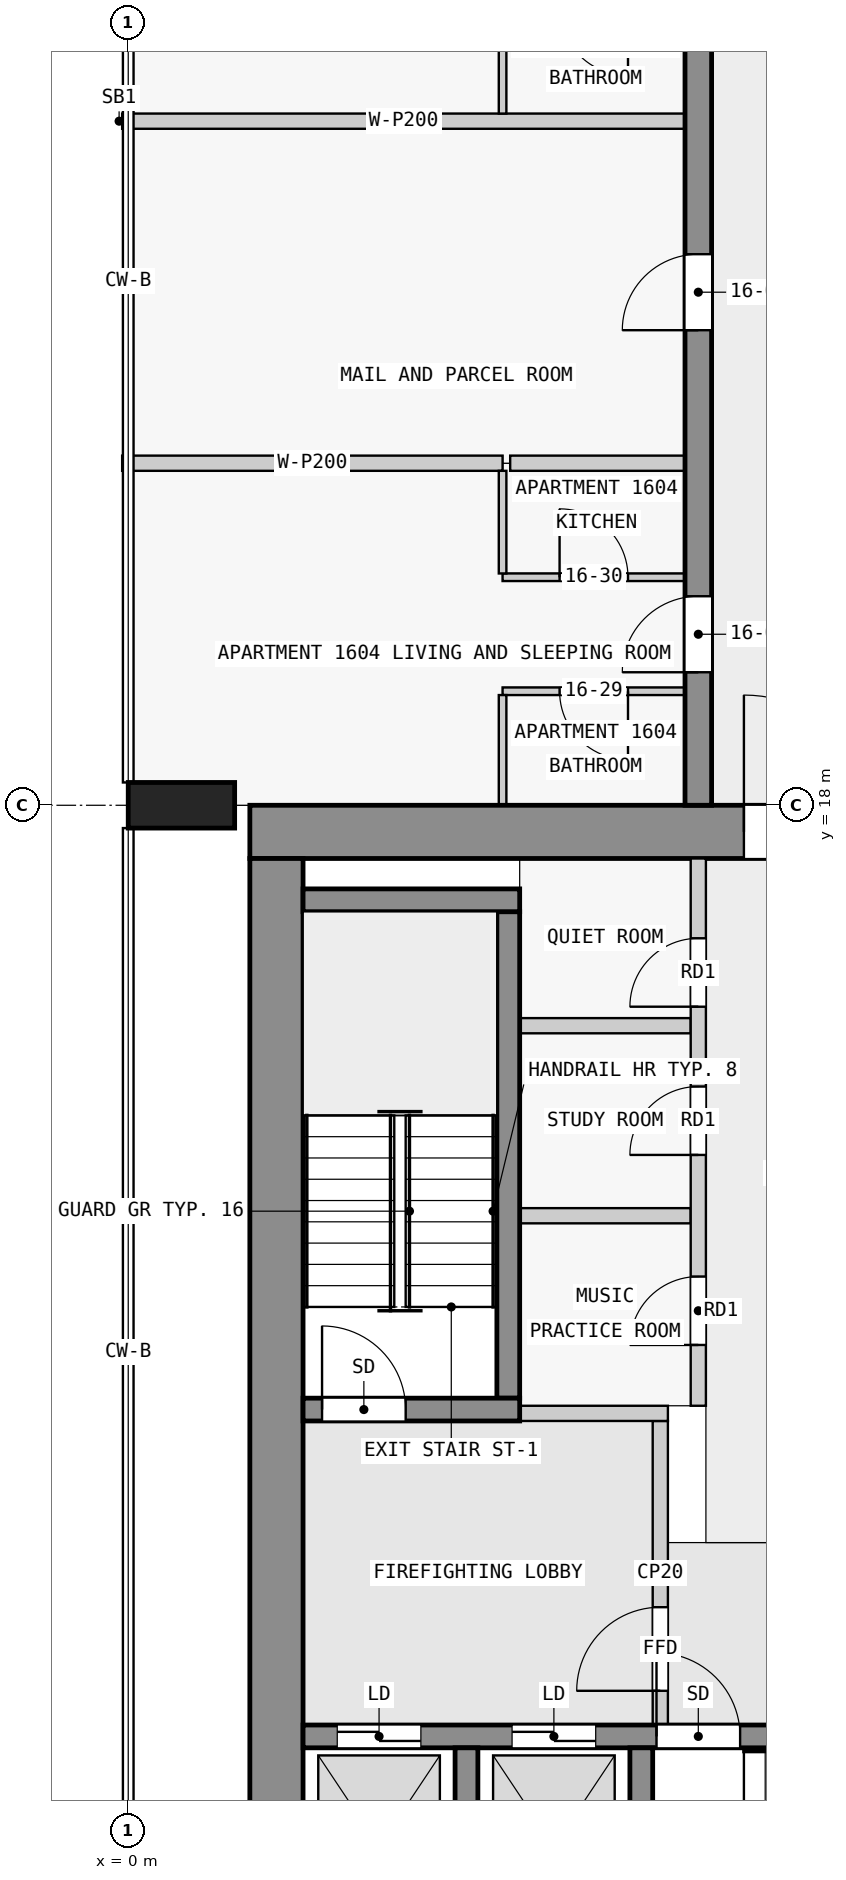
"""IFC4 building model, lengths in metres.
Left out: names, types, materials, properties, quantities, classifications, styles, units other than length and angle.
Written with IfcOpenShell. Run it as: python <this file> out.ifc"""

import sys

from ifc_helpers import new_model, si_unit, direction, frame, frame_2d, origin, origin_2d, place, context, subcontext, project, spatial, rectangle, extrude, element, fill, save


model = new_model("IFC4")
c1 = context("Model", 3, precision=1e-05, world=origin(), true_north=direction((0.0, 1.0)))
c2 = subcontext(c1, "Body", "Model", "MODEL_VIEW")
j1 = project(units=[si_unit("LENGTHUNIT", "METRE"), si_unit("PLANEANGLEUNIT", "RADIAN")], contexts=[c1])
p1 = place(None, origin())
s1 = spatial("IfcSite", under=j1, at=p1, CompositionType="ELEMENT")
p2 = place(p1, origin())
s2 = spatial("IfcBuilding", under=s1, at=p2, CompositionType="ELEMENT")
p3 = place(p2, frame((0.0, 0.0, 65.3)))
s3 = spatial("IfcBuildingStorey", under=s2, at=p3, CompositionType="ELEMENT", Elevation=65.3)
p4 = place(p3, frame((0.7, 18.0, 0.0), z_axis=(0.0, 0.0, 1.0), x_axis=(0.0, 1.0, 0.0)))
e1 = element("IfcColumn", 1, at=p4, inside=s3, PredefinedType="COLUMN", context=c2, shape_type="SweptSolid", body=[
    extrude(rectangle(XDim=0.6, YDim=1.4, at=origin_2d()), origin(), (0.0, 0.0, 1.0), 3.5),
])
p5 = place(p3, frame((1.6, 17.65, 0.0), z_axis=(0.0, 0.0, 1.0), x_axis=(1.0, 0.0, 0.0)))
e2 = element("IfcWall", 2, at=p5, inside=s3, PredefinedType="SHEAR", context=c2, shape_type="SweptSolid", body=[
    extrude(rectangle(XDim=20.9, YDim=0.7, at=frame_2d((10.45, 0.0))), origin(), (0.0, 0.0, 1.0), 3.25),
])
p6 = place(p5, frame((6.5, 0.0, 0.0)))
e3 = element("IfcOpeningElement", 3, at=p6, cuts=e2, PredefinedType="OPENING", context=c2, shape_type="SweptSolid", body=[
    extrude(rectangle(XDim=1.8, YDim=2.1, at=frame_2d((0.9, 1.05))), frame((0.0, 0.36, 0.0), z_axis=(0.0, -1.0, 0.0), x_axis=(1.0, 0.0, 0.0)), (0.0, 0.0, 1.0), 0.72),
])
p7 = place(p3, frame((1.95, 2.5, 0.0), z_axis=(0.0, 0.0, 1.0), x_axis=(0.0, 1.0, 0.0)))
e4 = element("IfcWall", 4, at=p7, inside=s3, PredefinedType="SHEAR", context=c2, shape_type="SweptSolid", body=[
    extrude(rectangle(XDim=14.8, YDim=0.7, at=frame_2d((7.4, 0.0))), origin(), (0.0, 0.0, 1.0), 3.25),
])
for number, where, z_axis, x_axis in (
    (5, (4.45, 2.8, 0.0), (0.0, 0.0, 1.0), (0.0, 1.0, 0.0)),
    (6, (6.75, 2.8, 0.0), (0.0, 0.0, 1.0), (0.0, 1.0, 0.0)),
):
    element("IfcWall", number, at=place(p3, frame(where, z_axis=z_axis, x_axis=x_axis)), inside=s3, PredefinedType="SHEAR", context=c2, shape_type="SweptSolid", body=[
        extrude(rectangle(XDim=2.8, YDim=0.3, at=frame_2d((1.4, 0.0))), origin(), (0.0, 0.0, 1.0), 3.25),
    ])
p8 = place(p3, frame((2.3, 5.75, 0.0), z_axis=(0.0, 0.0, 1.0), x_axis=(1.0, 0.0, 0.0)))
e7 = element("IfcWall", 7, at=p8, inside=s3, PredefinedType="SHEAR", context=c2, shape_type="SweptSolid", body=[
    extrude(rectangle(XDim=18.8, YDim=0.3, at=frame_2d((9.4, 0.0))), origin(), (0.0, 0.0, 1.0), 3.25),
])
p9 = place(p8, frame((4.65, 0.0, 0.0)))
e8 = element("IfcOpeningElement", 8, at=p9, cuts=e7, PredefinedType="OPENING", context=c2, shape_type="SweptSolid", body=[
    extrude(rectangle(XDim=1.1, YDim=2.1, at=frame_2d((0.55, 1.05))), frame((0.0, 0.16, 0.0), z_axis=(0.0, -1.0, 0.0), x_axis=(1.0, 0.0, 0.0)), (0.0, 0.0, 1.0), 0.32),
])
p10 = place(p8, frame((0.45, 0.0, 0.0)))
e9 = element("IfcOpeningElement", 9, at=p10, cuts=e7, PredefinedType="OPENING", context=c2, shape_type="SweptSolid", body=[
    extrude(rectangle(XDim=1.1, YDim=2.1, at=frame_2d((0.55, 1.05))), frame((0.0, 0.16, 0.0), z_axis=(0.0, -1.0, 0.0), x_axis=(1.0, 0.0, 0.0)), (0.0, 0.0, 1.0), 0.32),
])
p11 = place(p8, frame((2.75, 0.0, 0.0)))
e10 = element("IfcOpeningElement", 10, at=p11, cuts=e7, PredefinedType="OPENING", context=c2, shape_type="SweptSolid", body=[
    extrude(rectangle(XDim=1.1, YDim=2.1, at=frame_2d((0.55, 1.05))), frame((0.0, 0.16, 0.0), z_axis=(0.0, -1.0, 0.0), x_axis=(1.0, 0.0, 0.0)), (0.0, 0.0, 1.0), 0.32),
])
p12 = place(p8, frame((11.85, 0.0, 0.0)))
e11 = element("IfcOpeningElement", 11, at=p12, cuts=e7, PredefinedType="OPENING", context=c2, shape_type="SweptSolid", body=[
    extrude(rectangle(XDim=1.1, YDim=2.1, at=frame_2d((0.55, 1.05))), frame((0.0, 0.16, 0.0), z_axis=(0.0, -1.0, 0.0), x_axis=(1.0, 0.0, 0.0)), (0.0, 0.0, 1.0), 0.32),
])
p13 = place(p8, frame((14.35, 0.0, 0.0)))
e12 = element("IfcOpeningElement", 12, at=p13, cuts=e7, PredefinedType="OPENING", context=c2, shape_type="SweptSolid", body=[
    extrude(rectangle(XDim=1.1, YDim=2.1, at=frame_2d((0.55, 1.05))), frame((0.0, 0.16, 0.0), z_axis=(0.0, -1.0, 0.0), x_axis=(1.0, 0.0, 0.0)), (0.0, 0.0, 1.0), 0.32),
])
p14 = place(p8, frame((16.85, 0.0, 0.0)))
e13 = element("IfcOpeningElement", 13, at=p14, cuts=e7, PredefinedType="OPENING", context=c2, shape_type="SweptSolid", body=[
    extrude(rectangle(XDim=1.1, YDim=2.1, at=frame_2d((0.55, 1.05))), frame((0.0, 0.16, 0.0), z_axis=(0.0, -1.0, 0.0), x_axis=(1.0, 0.0, 0.0)), (0.0, 0.0, 1.0), 0.32),
])
p15 = place(p3, frame((2.3, 10.05, 0.0), z_axis=(0.0, 0.0, 1.0), x_axis=(1.0, 0.0, 0.0)))
e14 = element("IfcWall", 14, at=p15, inside=s3, PredefinedType="SHEAR", context=c2, shape_type="SweptSolid", body=[
    extrude(rectangle(XDim=2.85, YDim=0.3, at=frame_2d((1.425, 0.0))), origin(), (0.0, 0.0, 1.0), 3.25),
])
p16 = place(p15, frame((0.25, 0.0, 0.0)))
e15 = element("IfcOpeningElement", 15, at=p16, cuts=e14, PredefinedType="OPENING", context=c2, shape_type="SweptSolid", body=[
    extrude(rectangle(XDim=1.1, YDim=2.1, at=frame_2d((0.55, 1.05))), frame((0.0, 0.16, 0.0), z_axis=(0.0, -1.0, 0.0), x_axis=(1.0, 0.0, 0.0)), (0.0, 0.0, 1.0), 0.32),
])
p17 = place(p3, frame((5.0, 10.2, 0.0), z_axis=(0.0, 0.0, 1.0), x_axis=(0.0, 1.0, 0.0)))
e16 = element("IfcWall", 16, at=p17, inside=s3, PredefinedType="SHEAR", context=c2, shape_type="SweptSolid", body=[
    extrude(rectangle(XDim=6.4, YDim=0.3, at=frame_2d((3.2, 0.0))), origin(), (0.0, 0.0, 1.0), 3.25),
])
p18 = place(p3, frame((2.3, 16.75, 0.0), z_axis=(0.0, 0.0, 1.0), x_axis=(1.0, 0.0, 0.0)))
e17 = element("IfcWall", 17, at=p18, inside=s3, PredefinedType="SHEAR", context=c2, shape_type="SweptSolid", body=[
    extrude(rectangle(XDim=2.85, YDim=0.3, at=frame_2d((1.425, 0.0))), origin(), (0.0, 0.0, 1.0), 3.25),
])
p19 = place(p3, frame((7.5, 18.0, 0.0), z_axis=(0.0, 0.0, 1.0), x_axis=(0.0, 1.0, 0.0)))
e18 = element("IfcWall", 18, at=p19, inside=s3, PredefinedType="SHEAR", context=c2, shape_type="SweptSolid", body=[
    extrude(rectangle(XDim=27.0, YDim=0.35, at=frame_2d((13.5, 0.0))), origin(), (0.0, 0.0, 1.0), 3.25),
])
p20 = place(p19, frame((1.75, 0.0, 0.0)))
e19 = element("IfcOpeningElement", 19, at=p20, cuts=e18, PredefinedType="OPENING", context=c2, shape_type="SweptSolid", body=[
    extrude(rectangle(XDim=1.0, YDim=2.1, at=frame_2d((0.5, 1.05))), frame((0.0, 0.185, 0.0), z_axis=(0.0, -1.0, 0.0), x_axis=(1.0, 0.0, 0.0)), (0.0, 0.0, 1.0), 0.37),
])
p21 = place(p19, frame((6.25, 0.0, 0.0)))
e20 = element("IfcOpeningElement", 20, at=p21, cuts=e18, PredefinedType="OPENING", context=c2, shape_type="SweptSolid", body=[
    extrude(rectangle(XDim=1.0, YDim=2.1, at=frame_2d((0.5, 1.05))), frame((0.0, 0.185, 0.0), z_axis=(0.0, -1.0, 0.0), x_axis=(1.0, 0.0, 0.0)), (0.0, 0.0, 1.0), 0.37),
])
p22 = place(p19, frame((10.75, 0.0, 0.0)))
e21 = element("IfcOpeningElement", 21, at=p22, cuts=e18, PredefinedType="OPENING", context=c2, shape_type="SweptSolid", body=[
    extrude(rectangle(XDim=1.0, YDim=2.1, at=frame_2d((0.5, 1.05))), frame((0.0, 0.185, 0.0), z_axis=(0.0, -1.0, 0.0), x_axis=(1.0, 0.0, 0.0)), (0.0, 0.0, 1.0), 0.37),
])
p23 = place(p19, frame((17.55, 0.0, 0.0)))
e22 = element("IfcOpeningElement", 22, at=p23, cuts=e18, PredefinedType="OPENING", context=c2, shape_type="SweptSolid", body=[
    extrude(rectangle(XDim=1.0, YDim=2.1, at=frame_2d((0.5, 1.05))), frame((0.0, 0.185, 0.0), z_axis=(0.0, -1.0, 0.0), x_axis=(1.0, 0.0, 0.0)), (0.0, 0.0, 1.0), 0.37),
])
p24 = place(p19, frame((23.25, 0.0, 0.0)))
e23 = element("IfcOpeningElement", 23, at=p24, cuts=e18, PredefinedType="OPENING", context=c2, shape_type="SweptSolid", body=[
    extrude(rectangle(XDim=0.9, YDim=2.1, at=frame_2d((0.45, 1.05))), frame((0.0, 0.185, 0.0), z_axis=(0.0, -1.0, 0.0), x_axis=(1.0, 0.0, 0.0)), (0.0, 0.0, 1.0), 0.37),
])
p25 = place(p19, frame((25.45, 0.0, 0.0)))
e24 = element("IfcOpeningElement", 24, at=p25, cuts=e18, PredefinedType="OPENING", context=c2, shape_type="SweptSolid", body=[
    extrude(rectangle(XDim=1.0, YDim=2.1, at=frame_2d((0.5, 1.05))), frame((0.0, 0.185, 0.0), z_axis=(0.0, -1.0, 0.0), x_axis=(1.0, 0.0, 0.0)), (0.0, 0.0, 1.0), 0.37),
])
p26 = place(p3, frame((7.0, 5.9, 0.0), z_axis=(0.0, 0.0, 1.0), x_axis=(0.0, 1.0, 0.0)))
e25 = element("IfcWall", 25, at=p26, inside=s3, PredefinedType="PARTITIONING", context=c2, shape_type="SweptSolid", body=[
    extrude(rectangle(XDim=4.0, YDim=0.2, at=frame_2d((2.0, 0.0))), origin(), (0.0, 0.0, 1.0), 3.25),
])
p27 = place(p26, frame((0.45, 0.0, 0.0)))
e26 = element("IfcOpeningElement", 26, at=p27, cuts=e25, PredefinedType="OPENING", context=c2, shape_type="SweptSolid", body=[
    extrude(rectangle(XDim=1.1, YDim=2.1, at=frame_2d((0.55, 1.05))), frame((0.0, 0.11, 0.0), z_axis=(0.0, -1.0, 0.0), x_axis=(1.0, 0.0, 0.0)), (0.0, 0.0, 1.0), 0.22),
])
p28 = place(p3, frame((5.15, 10.0, 0.0), z_axis=(0.0, 0.0, 1.0), x_axis=(1.0, 0.0, 0.0)))
e27 = element("IfcWall", 27, at=p28, inside=s3, PredefinedType="PARTITIONING", context=c2, shape_type="SweptSolid", body=[
    extrude(rectangle(XDim=1.95, YDim=0.2, at=frame_2d((0.975, 0.0))), origin(), (0.0, 0.0, 1.0), 3.25),
])
p29 = place(p3, frame((7.5, 10.1, 0.0), z_axis=(0.0, 0.0, 1.0), x_axis=(0.0, 1.0, 0.0)))
e28 = element("IfcWall", 28, at=p29, inside=s3, PredefinedType="PARTITIONING", context=c2, shape_type="SweptSolid", body=[
    extrude(rectangle(XDim=7.2, YDim=0.2, at=frame_2d((3.6, 0.0))), origin(), (0.0, 0.0, 1.0), 3.25),
])
p30 = place(p29, frame((0.8, 0.0, 0.0)))
e29 = element("IfcOpeningElement", 29, at=p30, cuts=e28, PredefinedType="OPENING", context=c2, shape_type="SweptSolid", body=[
    extrude(rectangle(XDim=0.9, YDim=2.1, at=frame_2d((0.45, 1.05))), frame((0.0, 0.11, 0.0), z_axis=(0.0, -1.0, 0.0), x_axis=(1.0, 0.0, 0.0)), (0.0, 0.0, 1.0), 0.22),
])
p31 = place(p29, frame((3.3, 0.0, 0.0)))
e30 = element("IfcOpeningElement", 30, at=p31, cuts=e28, PredefinedType="OPENING", context=c2, shape_type="SweptSolid", body=[
    extrude(rectangle(XDim=0.9, YDim=2.1, at=frame_2d((0.45, 1.05))), frame((0.0, 0.11, 0.0), z_axis=(0.0, -1.0, 0.0), x_axis=(1.0, 0.0, 0.0)), (0.0, 0.0, 1.0), 0.22),
])
p32 = place(p29, frame((5.25, 0.0, 0.0)))
e31 = element("IfcOpeningElement", 31, at=p32, cuts=e28, PredefinedType="OPENING", context=c2, shape_type="SweptSolid", body=[
    extrude(rectangle(XDim=0.9, YDim=2.1, at=frame_2d((0.45, 1.05))), frame((0.0, 0.11, 0.0), z_axis=(0.0, -1.0, 0.0), x_axis=(1.0, 0.0, 0.0)), (0.0, 0.0, 1.0), 0.22),
])
for number, where, z_axis, x_axis in (
    (32, (5.15, 12.6, 0.0), (0.0, 0.0, 1.0), (1.0, 0.0, 0.0)),
    (33, (5.15, 15.1, 0.0), (0.0, 0.0, 1.0), (1.0, 0.0, 0.0)),
):
    element("IfcWall", number, at=place(p3, frame(where, z_axis=z_axis, x_axis=x_axis)), inside=s3, PredefinedType="PARTITIONING", context=c2, shape_type="SweptSolid", body=[
        extrude(rectangle(XDim=2.25, YDim=0.2, at=frame_2d((1.125, 0.0))), origin(), (0.0, 0.0, 1.0), 3.25),
    ])
p33 = place(p3, frame((7.325, 19.5, 0.0), z_axis=(0.0, 0.0, 1.0), x_axis=(-1.0, 0.0, 0.0)))
e34 = element("IfcWall", 34, at=p33, inside=s3, PredefinedType="PARTITIONING", context=c2, shape_type="SweptSolid", body=[
    extrude(rectangle(XDim=2.4, YDim=0.1, at=frame_2d((1.2, 0.0))), origin(), (0.0, 0.0, 1.0), 3.25),
])
p34 = place(p33, frame((0.75, 0.0, 0.0)))
e35 = element("IfcOpeningElement", 35, at=p34, cuts=e34, PredefinedType="OPENING", context=c2, shape_type="SweptSolid", body=[
    extrude(rectangle(XDim=0.9, YDim=2.1, at=frame_2d((0.45, 1.05))), frame((0.0, 0.06, 0.0), z_axis=(0.0, -1.0, 0.0), x_axis=(1.0, 0.0, 0.0)), (0.0, 0.0, 1.0), 0.12),
])
p35 = place(p3, frame((4.925, 21.0, 0.0), z_axis=(0.0, 0.0, 1.0), x_axis=(1.0, 0.0, 0.0)))
e36 = element("IfcWall", 36, at=p35, inside=s3, PredefinedType="PARTITIONING", context=c2, shape_type="SweptSolid", body=[
    extrude(rectangle(XDim=2.4, YDim=0.1, at=frame_2d((1.2, 0.0))), origin(), (0.0, 0.0, 1.0), 3.25),
])
p36 = place(p35, frame((0.75, 0.0, 0.0)))
e37 = element("IfcOpeningElement", 37, at=p36, cuts=e36, PredefinedType="OPENING", context=c2, shape_type="SweptSolid", body=[
    extrude(rectangle(XDim=0.9, YDim=2.1, at=frame_2d((0.45, 1.05))), frame((0.0, 0.06, 0.0), z_axis=(0.0, -1.0, 0.0), x_axis=(1.0, 0.0, 0.0)), (0.0, 0.0, 1.0), 0.12),
])
p37 = place(p3, frame((7.325, 22.5, 0.0), z_axis=(0.0, 0.0, 1.0), x_axis=(-1.0, 0.0, 0.0)))
e38 = element("IfcWall", 38, at=p37, inside=s3, PredefinedType="PARTITIONING", context=c2, shape_type="SweptSolid", body=[
    extrude(rectangle(XDim=2.3, YDim=0.2, at=frame_2d((1.15, 0.0))), origin(), (0.0, 0.0, 1.0), 3.25),
])
p38 = place(p3, frame((-0.08, 22.5, 0.0), z_axis=(0.0, 0.0, 1.0), x_axis=(1.0, 0.0, 0.0)))
e39 = element("IfcWall", 39, at=p38, inside=s3, PredefinedType="PARTITIONING", context=c2, shape_type="SweptSolid", body=[
    extrude(rectangle(XDim=5.005, YDim=0.2, at=frame_2d((2.502, 0.0))), origin(), (0.0, 0.0, 1.0), 3.25),
])
p39 = place(p3, frame((7.325, 27.0, 0.0), z_axis=(0.0, 0.0, 1.0), x_axis=(-1.0, 0.0, 0.0)))
e40 = element("IfcWall", 40, at=p39, inside=s3, PredefinedType="PARTITIONING", context=c2, shape_type="SweptSolid", body=[
    extrude(rectangle(XDim=7.405, YDim=0.2, at=frame_2d((3.703, 0.0))), origin(), (0.0, 0.0, 1.0), 3.25),
])
p40 = place(p3, frame((4.925, 19.45, 0.0), z_axis=(0.0, 0.0, 1.0), x_axis=(0.0, -1.0, 0.0)))
e41 = element("IfcWall", 41, at=p40, inside=s3, PredefinedType="PARTITIONING", context=c2, shape_type="SweptSolid", body=[
    extrude(rectangle(XDim=1.45, YDim=0.1, at=frame_2d((0.725, 0.0))), origin(), (0.0, 0.0, 1.0), 3.25),
])
for number, where, z_axis, x_axis in (
    (42, (4.925, 22.4, 0.0), (0.0, 0.0, 1.0), (0.0, -1.0, 0.0)),
    (43, (4.925, 28.45, 0.0), (0.0, 0.0, 1.0), (0.0, -1.0, 0.0)),
):
    element("IfcWall", number, at=place(p3, frame(where, z_axis=z_axis, x_axis=x_axis)), inside=s3, PredefinedType="PARTITIONING", context=c2, shape_type="SweptSolid", body=[
        extrude(rectangle(XDim=1.35, YDim=0.1, at=frame_2d((0.675, 0.0))), origin(), (0.0, 0.0, 1.0), 3.25),
    ])
p41 = place(p27, origin())
e44 = element("IfcDoor", 44, at=p41, inside=s3, OperationType="SINGLE_SWING_LEFT", PredefinedType="DOOR", context=c2, shape_type="SweptSolid", body=[
    extrude(rectangle(XDim=1.1, YDim=2.1, at=frame_2d((0.55, 1.05))), frame((0.0, 0.025, 0.0), z_axis=(0.0, -1.0, 0.0), x_axis=(1.0, 0.0, 0.0)), (0.0, 0.0, 1.0), 0.05),
])
fill(e26, e44)
p42 = place(p16, origin())
e45 = element("IfcDoor", 45, at=p42, inside=s3, OperationType="SINGLE_SWING_RIGHT", PredefinedType="DOOR", context=c2, shape_type="SweptSolid", body=[
    extrude(rectangle(XDim=1.1, YDim=2.1, at=frame_2d((0.55, 1.05))), frame((0.0, 0.025, 0.0), z_axis=(0.0, -1.0, 0.0), x_axis=(1.0, 0.0, 0.0)), (0.0, 0.0, 1.0), 0.05),
])
fill(e15, e45)
p43 = place(p9, origin())
e46 = element("IfcDoor", 46, at=p43, inside=s3, OperationType="SINGLE_SWING_LEFT", PredefinedType="DOOR", context=c2, shape_type="SweptSolid", body=[
    extrude(rectangle(XDim=1.1, YDim=2.1, at=frame_2d((0.55, 1.05))), frame((0.0, 0.025, 0.0), z_axis=(0.0, -1.0, 0.0), x_axis=(1.0, 0.0, 0.0)), (0.0, 0.0, 1.0), 0.05),
])
fill(e8, e46)
p44 = place(p10, origin())
e47 = element("IfcDoor", 47, at=p44, inside=s3, OperationType="DOUBLE_DOOR_SLIDING", PredefinedType="DOOR", context=c2, shape_type="SweptSolid", body=[
    extrude(rectangle(XDim=1.1, YDim=2.1, at=frame_2d((0.55, 1.05))), frame((0.0, 0.025, 0.0), z_axis=(0.0, -1.0, 0.0), x_axis=(1.0, 0.0, 0.0)), (0.0, 0.0, 1.0), 0.05),
])
fill(e9, e47)
p45 = place(p11, origin())
e48 = element("IfcDoor", 48, at=p45, inside=s3, OperationType="DOUBLE_DOOR_SLIDING", PredefinedType="DOOR", context=c2, shape_type="SweptSolid", body=[
    extrude(rectangle(XDim=1.1, YDim=2.1, at=frame_2d((0.55, 1.05))), frame((0.0, 0.025, 0.0), z_axis=(0.0, -1.0, 0.0), x_axis=(1.0, 0.0, 0.0)), (0.0, 0.0, 1.0), 0.05),
])
fill(e10, e48)
p46 = place(p6, origin())
e49 = element("IfcDoor", 49, at=p46, inside=s3, OperationType="DOUBLE_DOOR_SINGLE_SWING", PredefinedType="DOOR", context=c2, shape_type="SweptSolid", body=[
    extrude(rectangle(XDim=1.8, YDim=2.1, at=frame_2d((0.9, 1.05))), frame((0.0, 0.025, 0.0), z_axis=(0.0, -1.0, 0.0), x_axis=(1.0, 0.0, 0.0)), (0.0, 0.0, 1.0), 0.05),
])
fill(e3, e49)
p47 = place(p30, origin())
e50 = element("IfcDoor", 50, at=p47, inside=s3, OperationType="SINGLE_SWING_RIGHT", PredefinedType="DOOR", context=c2, shape_type="SweptSolid", body=[
    extrude(rectangle(XDim=0.9, YDim=2.1, at=frame_2d((0.45, 1.05))), frame((0.0, 0.025, 0.0), z_axis=(0.0, -1.0, 0.0), x_axis=(1.0, 0.0, 0.0)), (0.0, 0.0, 1.0), 0.05),
])
fill(e29, e50)
p48 = place(p31, origin())
e51 = element("IfcDoor", 51, at=p48, inside=s3, OperationType="SINGLE_SWING_RIGHT", PredefinedType="DOOR", context=c2, shape_type="SweptSolid", body=[
    extrude(rectangle(XDim=0.9, YDim=2.1, at=frame_2d((0.45, 1.05))), frame((0.0, 0.025, 0.0), z_axis=(0.0, -1.0, 0.0), x_axis=(1.0, 0.0, 0.0)), (0.0, 0.0, 1.0), 0.05),
])
fill(e30, e51)
p49 = place(p32, origin())
e52 = element("IfcDoor", 52, at=p49, inside=s3, OperationType="SINGLE_SWING_RIGHT", PredefinedType="DOOR", context=c2, shape_type="SweptSolid", body=[
    extrude(rectangle(XDim=0.9, YDim=2.1, at=frame_2d((0.45, 1.05))), frame((0.0, 0.025, 0.0), z_axis=(0.0, -1.0, 0.0), x_axis=(1.0, 0.0, 0.0)), (0.0, 0.0, 1.0), 0.05),
])
fill(e31, e52)
p50 = place(p20, origin())
e53 = element("IfcDoor", 53, at=p50, inside=s3, OperationType="SINGLE_SWING_LEFT", PredefinedType="DOOR", context=c2, shape_type="SweptSolid", body=[
    extrude(rectangle(XDim=1.0, YDim=2.1, at=frame_2d((0.5, 1.05))), frame((0.0, 0.025, 0.0), z_axis=(0.0, -1.0, 0.0), x_axis=(1.0, 0.0, 0.0)), (0.0, 0.0, 1.0), 0.05),
])
fill(e19, e53)
p51 = place(p21, origin())
e54 = element("IfcDoor", 54, at=p51, inside=s3, OperationType="SINGLE_SWING_LEFT", PredefinedType="DOOR", context=c2, shape_type="SweptSolid", body=[
    extrude(rectangle(XDim=1.0, YDim=2.1, at=frame_2d((0.5, 1.05))), frame((0.0, 0.025, 0.0), z_axis=(0.0, -1.0, 0.0), x_axis=(1.0, 0.0, 0.0)), (0.0, 0.0, 1.0), 0.05),
])
fill(e20, e54)
p52 = place(p34, origin())
e55 = element("IfcDoor", 55, at=p52, inside=s3, OperationType="SINGLE_SWING_LEFT", PredefinedType="DOOR", context=c2, shape_type="SweptSolid", body=[
    extrude(rectangle(XDim=0.9, YDim=2.1, at=frame_2d((0.45, 1.05))), frame((0.0, 0.025, 0.0), z_axis=(0.0, -1.0, 0.0), x_axis=(1.0, 0.0, 0.0)), (0.0, 0.0, 1.0), 0.05),
])
fill(e35, e55)
p53 = place(p36, origin())
e56 = element("IfcDoor", 56, at=p53, inside=s3, OperationType="SINGLE_SWING_LEFT", PredefinedType="DOOR", context=c2, shape_type="SweptSolid", body=[
    extrude(rectangle(XDim=0.9, YDim=2.1, at=frame_2d((0.45, 1.05))), frame((0.0, 0.025, 0.0), z_axis=(0.0, -1.0, 0.0), x_axis=(1.0, 0.0, 0.0)), (0.0, 0.0, 1.0), 0.05),
])
fill(e37, e56)
save(model, sys.argv[1])
